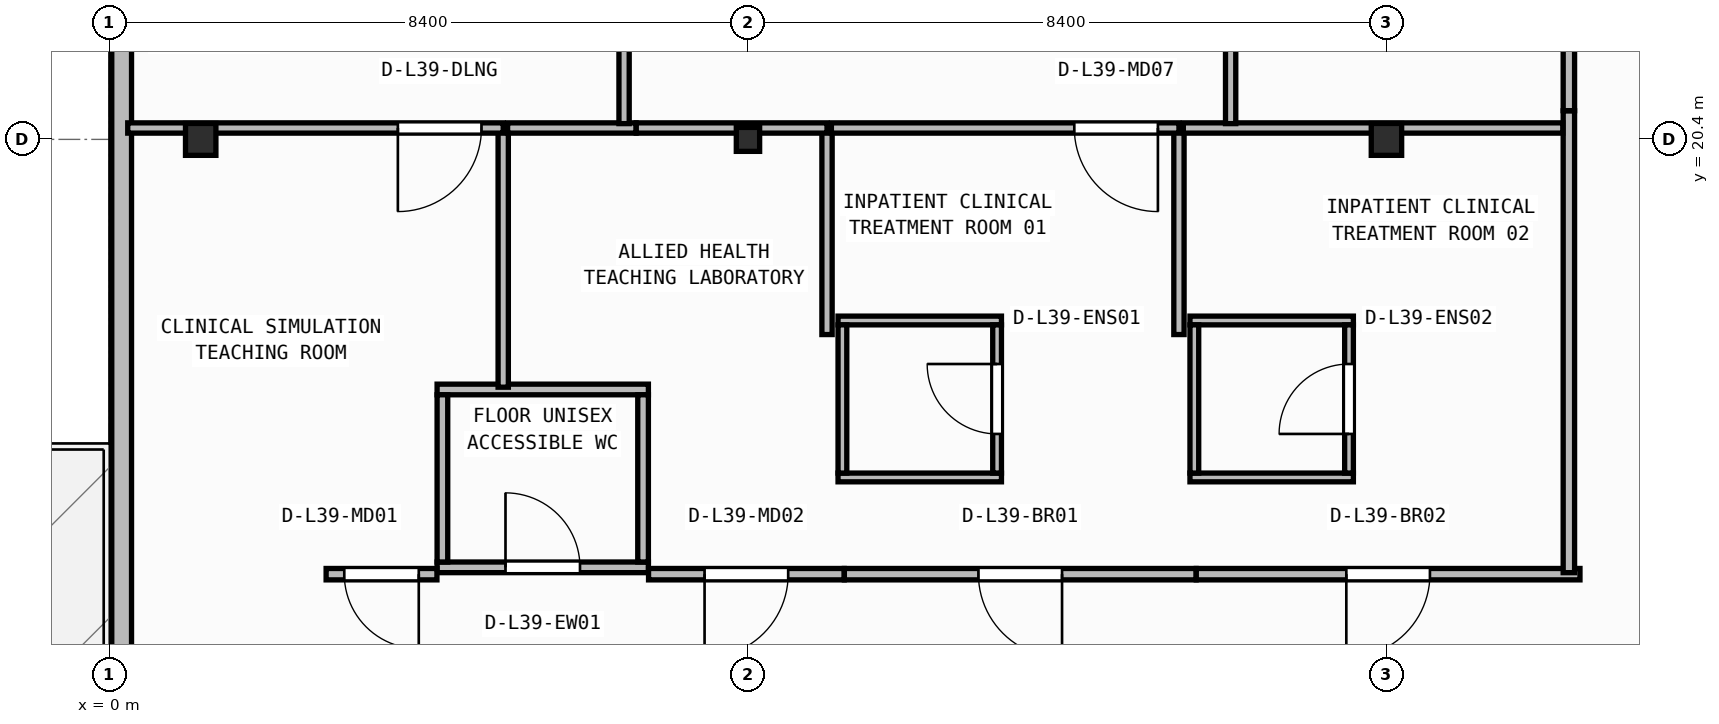
"""IFC4 building model, lengths in metres.
Left out: names, types, materials, properties, quantities, classifications, styles, units other than length and angle.
Written with IfcOpenShell. Run it as: python <this file> out.ifc"""

import sys

from ifc_helpers import new_model, si_unit, direction, frame, frame_2d, origin, origin_2d, place, context, subcontext, project, spatial, rectangle, i_section, extrude, element, fill, save


model = new_model("IFC4")
c1 = context("Model", 3, precision=1e-05, world=origin(), true_north=direction((0.0, 1.0)))
c2 = subcontext(c1, "Body", "Model", "MODEL_VIEW")
j1 = project(units=[si_unit("LENGTHUNIT", "METRE"), si_unit("PLANEANGLEUNIT", "RADIAN")], contexts=[c1])
p1 = place(None, origin())
s1 = spatial("IfcSite", under=j1, at=p1, CompositionType="ELEMENT")
p2 = place(p1, origin())
s2 = spatial("IfcBuilding", under=s1, at=p2, CompositionType="ELEMENT")
p3 = place(p2, frame((0.0, 0.0, 158.65)))
s3 = spatial("IfcBuildingStorey", under=s2, at=p3, CompositionType="ELEMENT", Elevation=158.65)
p4 = place(p3, frame((1.2, 20.4, 0.0), z_axis=(0.0, 0.0, 1.0), x_axis=(1.0, 0.0, 0.0)))
e1 = element("IfcColumn", 1, at=p4, inside=s3, PredefinedType="COLUMN", context=c2, shape_type="SweptSolid", body=[
    extrude(i_section(OverallWidth=0.4, OverallDepth=0.42, WebThickness=0.025, FlangeThickness=0.04, at=origin_2d()), origin(), (0.0, 0.0, 1.0), 3.95),
])
p5 = place(p3, frame((8.4, 20.4, 0.0), z_axis=(0.0, 0.0, 1.0), x_axis=(1.0, 0.0, 0.0)))
e2 = element("IfcColumn", 2, at=p5, inside=s3, PredefinedType="COLUMN", context=c2, shape_type="SweptSolid", body=[
    extrude(i_section(OverallWidth=0.307, OverallDepth=0.315, WebThickness=0.012, FlangeThickness=0.019, FilletRadius=0.017, at=origin_2d()), origin(), (0.0, 0.0, 1.0), 3.95),
])
p6 = place(p3, frame((16.8, 20.4, 0.0), z_axis=(0.0, 0.0, 1.0), x_axis=(1.0, 0.0, 0.0)))
e3 = element("IfcColumn", 3, at=p6, inside=s3, PredefinedType="COLUMN", context=c2, shape_type="SweptSolid", body=[
    extrude(i_section(OverallWidth=0.4, OverallDepth=0.42, WebThickness=0.025, FlangeThickness=0.04, at=origin_2d()), origin(), (0.0, 0.0, 1.0), 3.95),
])
p7 = place(p3, frame((0.16, 40.64, 0.0), z_axis=(0.0, 0.0, 1.0), x_axis=(0.0, -1.0, 0.0)))
e4 = element("IfcWall", 4, at=p7, inside=s3, PredefinedType="STANDARD", context=c2, shape_type="SweptSolid", body=[
    extrude(rectangle(XDim=37.88, YDim=0.26, at=frame_2d((18.94, 0.0))), origin(), (0.0, 0.0, 1.0), 3.71),
])
p8 = place(p7, frame((29.865, 0.0, 0.0)))
e5 = element("IfcOpeningElement", 5, at=p8, cuts=e4, PredefinedType="OPENING", context=c2, shape_type="SweptSolid", body=[
    extrude(rectangle(XDim=1.3, YDim=2.15, at=frame_2d((0.65, 1.075))), frame((0.0, 0.14, 0.0), z_axis=(0.0, -1.0, 0.0), x_axis=(1.0, 0.0, 0.0)), (0.0, 0.0, 1.0), 0.28),
])
p9 = place(p3, frame((4.31, 14.77, 0.0), z_axis=(0.0, 0.0, 1.0), x_axis=(1.0, 0.0, 0.0)))
e6 = element("IfcWall", 6, at=p9, inside=s3, PredefinedType="PARTITIONING", context=c2, shape_type="SweptSolid", body=[
    extrude(rectangle(XDim=2.78, YDim=0.14, at=frame_2d((1.39, 0.0))), origin(), (0.0, 0.0, 1.0), 3.71),
])
p10 = place(p9, frame((0.9, 0.0, 0.0)))
e7 = element("IfcOpeningElement", 7, at=p10, cuts=e6, PredefinedType="OPENING", context=c2, shape_type="SweptSolid", body=[
    extrude(rectangle(XDim=0.98, YDim=2.1, at=frame_2d((0.49, 1.05))), frame((0.0, 0.08, 0.0), z_axis=(0.0, -1.0, 0.0), x_axis=(1.0, 0.0, 0.0)), (0.0, 0.0, 1.0), 0.16),
])
p11 = place(p3, frame((4.31, 17.11, 0.0), z_axis=(0.0, 0.0, 1.0), x_axis=(1.0, 0.0, 0.0)))
e8 = element("IfcWall", 8, at=p11, inside=s3, PredefinedType="PARTITIONING", context=c2, shape_type="SweptSolid", body=[
    extrude(rectangle(XDim=2.78, YDim=0.14, at=frame_2d((1.39, 0.0))), origin(), (0.0, 0.0, 1.0), 3.71),
])
for number, where, z_axis, x_axis in (
    (9, (4.38, 14.84, 0.0), (0.0, 0.0, 1.0), (0.0, 1.0, 0.0)),
    (10, (7.02, 14.84, 0.0), (0.0, 0.0, 1.0), (0.0, 1.0, 0.0)),
):
    element("IfcWall", number, at=place(p3, frame(where, z_axis=z_axis, x_axis=x_axis)), inside=s3, PredefinedType="PARTITIONING", context=c2, shape_type="SweptSolid", body=[
        extrude(rectangle(XDim=2.2, YDim=0.14, at=frame_2d((1.1, 0.0))), origin(), (0.0, 0.0, 1.0), 3.71),
    ])
for number, where, z_axis, x_axis in (
    (11, (9.585, 15.952, 0.0), (0.0, 0.0, 1.0), (1.0, 0.0, 0.0)),
    (12, (9.585, 18.018, 0.0), (0.0, 0.0, 1.0), (1.0, 0.0, 0.0)),
):
    element("IfcWall", number, at=place(p3, frame(where, z_axis=z_axis, x_axis=x_axis)), inside=s3, PredefinedType="PARTITIONING", context=c2, shape_type="SweptSolid", body=[
        extrude(rectangle(XDim=2.15, YDim=0.115, at=frame_2d((1.075, 0.0))), origin(), (0.0, 0.0, 1.0), 3.71),
    ])
p12 = place(p3, frame((9.643, 16.01, 0.0), z_axis=(0.0, 0.0, 1.0), x_axis=(0.0, 1.0, 0.0)))
e13 = element("IfcWall", 13, at=p12, inside=s3, PredefinedType="PARTITIONING", context=c2, shape_type="SweptSolid", body=[
    extrude(rectangle(XDim=1.95, YDim=0.115, at=frame_2d((0.975, 0.0))), origin(), (0.0, 0.0, 1.0), 3.71),
])
p13 = place(p3, frame((11.677, 16.01, 0.0), z_axis=(0.0, 0.0, 1.0), x_axis=(0.0, 1.0, 0.0)))
e14 = element("IfcWall", 14, at=p13, inside=s3, PredefinedType="PARTITIONING", context=c2, shape_type="SweptSolid", body=[
    extrude(rectangle(XDim=1.95, YDim=0.115, at=frame_2d((0.975, 0.0))), origin(), (0.0, 0.0, 1.0), 3.71),
])
p14 = place(p13, frame((0.515, 0.0, 0.0)))
e15 = element("IfcOpeningElement", 15, at=p14, cuts=e14, PredefinedType="OPENING", context=c2, shape_type="SweptSolid", body=[
    extrude(rectangle(XDim=0.92, YDim=2.1, at=frame_2d((0.46, 1.05))), frame((0.0, 0.067, 0.0), z_axis=(0.0, -1.0, 0.0), x_axis=(1.0, 0.0, 0.0)), (0.0, 0.0, 1.0), 0.135),
])
for number, where, z_axis, x_axis in (
    (16, (14.215, 15.952, 0.0), (0.0, 0.0, 1.0), (1.0, 0.0, 0.0)),
    (17, (14.215, 18.018, 0.0), (0.0, 0.0, 1.0), (1.0, 0.0, 0.0)),
):
    element("IfcWall", number, at=place(p3, frame(where, z_axis=z_axis, x_axis=x_axis)), inside=s3, PredefinedType="PARTITIONING", context=c2, shape_type="SweptSolid", body=[
        extrude(rectangle(XDim=2.15, YDim=0.115, at=frame_2d((1.075, 0.0))), origin(), (0.0, 0.0, 1.0), 3.71),
    ])
p15 = place(p3, frame((14.272, 16.01, 0.0), z_axis=(0.0, 0.0, 1.0), x_axis=(0.0, 1.0, 0.0)))
e18 = element("IfcWall", 18, at=p15, inside=s3, PredefinedType="PARTITIONING", context=c2, shape_type="SweptSolid", body=[
    extrude(rectangle(XDim=1.95, YDim=0.115, at=frame_2d((0.975, 0.0))), origin(), (0.0, 0.0, 1.0), 3.71),
])
p16 = place(p3, frame((16.308, 16.01, 0.0), z_axis=(0.0, 0.0, 1.0), x_axis=(0.0, 1.0, 0.0)))
e19 = element("IfcWall", 19, at=p16, inside=s3, PredefinedType="PARTITIONING", context=c2, shape_type="SweptSolid", body=[
    extrude(rectangle(XDim=1.95, YDim=0.115, at=frame_2d((0.975, 0.0))), origin(), (0.0, 0.0, 1.0), 3.71),
])
p17 = place(p16, frame((0.515, 0.0, 0.0)))
e20 = element("IfcOpeningElement", 20, at=p17, cuts=e19, PredefinedType="OPENING", context=c2, shape_type="SweptSolid", body=[
    extrude(rectangle(XDim=0.92, YDim=2.1, at=frame_2d((0.46, 1.05))), frame((0.0, 0.067, 0.0), z_axis=(0.0, -1.0, 0.0), x_axis=(1.0, 0.0, 0.0)), (0.0, 0.0, 1.0), 0.135),
])
p18 = place(p3, frame((4.308, 14.68, 0.0), z_axis=(0.0, 0.0, 1.0), x_axis=(-1.0, 0.0, 0.0)))
e21 = element("IfcWall", 21, at=p18, inside=s3, PredefinedType="PARTITIONING", context=c2, shape_type="SweptSolid", body=[
    extrude(rectangle(XDim=1.458, YDim=0.15, at=frame_2d((0.729, 0.0))), origin(), (0.0, 0.0, 1.0), 3.71),
])
p19 = place(p18, frame((0.239, 0.0, 0.0)))
e22 = element("IfcOpeningElement", 22, at=p19, cuts=e21, PredefinedType="OPENING", context=c2, shape_type="SweptSolid", body=[
    extrude(rectangle(XDim=0.98, YDim=2.1, at=frame_2d((0.49, 1.05))), frame((0.0, 0.085, 0.0), z_axis=(0.0, -1.0, 0.0), x_axis=(1.0, 0.0, 0.0)), (0.0, 0.0, 1.0), 0.17),
])
p20 = place(p3, frame((9.666, 14.68, 0.0), z_axis=(0.0, 0.0, 1.0), x_axis=(-1.0, 0.0, 0.0)))
e23 = element("IfcWall", 23, at=p20, inside=s3, PredefinedType="PARTITIONING", context=c2, shape_type="SweptSolid", body=[
    extrude(rectangle(XDim=2.574, YDim=0.15, at=frame_2d((1.287, 0.0))), origin(), (0.0, 0.0, 1.0), 3.71),
])
p21 = place(p20, frame((0.737, 0.0, 0.0)))
e24 = element("IfcOpeningElement", 24, at=p21, cuts=e23, PredefinedType="OPENING", context=c2, shape_type="SweptSolid", body=[
    extrude(rectangle(XDim=1.1, YDim=2.1, at=frame_2d((0.55, 1.05))), frame((0.0, 0.085, 0.0), z_axis=(0.0, -1.0, 0.0), x_axis=(1.0, 0.0, 0.0)), (0.0, 0.0, 1.0), 0.17),
])
p22 = place(p3, frame((14.296, 14.68, 0.0), z_axis=(0.0, 0.0, 1.0), x_axis=(-1.0, 0.0, 0.0)))
e25 = element("IfcWall", 25, at=p22, inside=s3, PredefinedType="PARTITIONING", context=c2, shape_type="SweptSolid", body=[
    extrude(rectangle(XDim=4.628, YDim=0.15, at=frame_2d((2.314, 0.0))), origin(), (0.0, 0.0, 1.0), 3.71),
])
p23 = place(p22, frame((1.764, 0.0, 0.0)))
e26 = element("IfcOpeningElement", 26, at=p23, cuts=e25, PredefinedType="OPENING", context=c2, shape_type="SweptSolid", body=[
    extrude(rectangle(XDim=1.1, YDim=2.1, at=frame_2d((0.55, 1.05))), frame((0.0, 0.085, 0.0), z_axis=(0.0, -1.0, 0.0), x_axis=(1.0, 0.0, 0.0)), (0.0, 0.0, 1.0), 0.17),
])
p24 = place(p3, frame((19.346, 14.68, 0.0), z_axis=(0.0, 0.0, 1.0), x_axis=(-1.0, 0.0, 0.0)))
e27 = element("IfcWall", 27, at=p24, inside=s3, PredefinedType="PARTITIONING", context=c2, shape_type="SweptSolid", body=[
    extrude(rectangle(XDim=5.048, YDim=0.15, at=frame_2d((2.524, 0.0))), origin(), (0.0, 0.0, 1.0), 3.71),
])
p25 = place(p24, frame((1.974, 0.0, 0.0)))
e28 = element("IfcOpeningElement", 28, at=p25, cuts=e27, PredefinedType="OPENING", context=c2, shape_type="SweptSolid", body=[
    extrude(rectangle(XDim=1.1, YDim=2.1, at=frame_2d((0.55, 1.05))), frame((0.0, 0.085, 0.0), z_axis=(0.0, -1.0, 0.0), x_axis=(1.0, 0.0, 0.0)), (0.0, 0.0, 1.0), 0.17),
])
p26 = place(p3, frame((19.2, 20.776, 0.0), z_axis=(0.0, 0.0, 1.0), x_axis=(0.0, -1.0, 0.0)))
e29 = element("IfcWall", 29, at=p26, inside=s3, PredefinedType="PARTITIONING", context=c2, shape_type="SweptSolid", body=[
    extrude(rectangle(XDim=6.076, YDim=0.15, at=frame_2d((3.038, 0.0))), origin(), (0.0, 0.0, 1.0), 3.71),
])
p27 = place(p3, frame((19.2, 27.26, 0.0), z_axis=(0.0, 0.0, 1.0), x_axis=(0.0, -1.0, 0.0)))
e30 = element("IfcWall", 30, at=p27, inside=s3, PredefinedType="PARTITIONING", context=c2, shape_type="SweptSolid", body=[
    extrude(rectangle(XDim=6.482, YDim=0.15, at=frame_2d((3.241, 0.0))), origin(), (0.0, 0.0, 1.0), 3.71),
])
p28 = place(p27, frame((2.068, 0.0, 0.0)))
e31 = element("IfcOpeningElement", 31, at=p28, cuts=e30, PredefinedType="OPENING", context=c2, shape_type="SweptSolid", body=[
    extrude(rectangle(XDim=1.1, YDim=2.1, at=frame_2d((0.55, 1.05))), frame((0.0, 0.085, 0.0), z_axis=(0.0, -1.0, 0.0), x_axis=(1.0, 0.0, 0.0)), (0.0, 0.0, 1.0), 0.17),
])
p29 = place(p3, frame((5.18, 17.14, 0.0), z_axis=(0.0, 0.0, 1.0), x_axis=(0.0, 1.0, 0.0)))
e32 = element("IfcWall", 32, at=p29, inside=s3, PredefinedType="PARTITIONING", context=c2, shape_type="SweptSolid", body=[
    extrude(rectangle(XDim=3.41, YDim=0.135, at=frame_2d((1.705, 0.0))), origin(), (0.0, 0.0, 1.0), 3.71),
])
p30 = place(p3, frame((5.18, 20.55, 0.0), z_axis=(0.0, 0.0, 1.0), x_axis=(-1.0, 0.0, 0.0)))
e33 = element("IfcWall", 33, at=p30, inside=s3, PredefinedType="PARTITIONING", context=c2, shape_type="SweptSolid", body=[
    extrude(rectangle(XDim=4.94, YDim=0.135, at=frame_2d((2.47, 0.0))), origin(), (0.0, 0.0, 1.0), 3.083),
])
p31 = place(p30, frame((0.286, 0.0, 0.0)))
e34 = element("IfcOpeningElement", 34, at=p31, cuts=e33, PredefinedType="OPENING", context=c2, shape_type="SweptSolid", body=[
    extrude(rectangle(XDim=1.1, YDim=2.1, at=frame_2d((0.55, 1.05))), frame((0.0, 0.077, 0.0), z_axis=(0.0, -1.0, 0.0), x_axis=(1.0, 0.0, 0.0)), (0.0, 0.0, 1.0), 0.155),
])
p32 = place(p3, frame((9.44, 17.833, 0.0), z_axis=(0.0, 0.0, 1.0), x_axis=(0.0, 1.0, 0.0)))
e35 = element("IfcWall", 35, at=p32, inside=s3, PredefinedType="PARTITIONING", context=c2, shape_type="SweptSolid", body=[
    extrude(rectangle(XDim=2.718, YDim=0.135, at=frame_2d((1.359, 0.0))), origin(), (0.0, 0.0, 1.0), 3.71),
])
p33 = place(p3, frame((6.928, 20.55, 0.0), z_axis=(0.0, 0.0, 1.0), x_axis=(-1.0, 0.0, 0.0)))
e36 = element("IfcWall", 36, at=p33, inside=s3, PredefinedType="PARTITIONING", context=c2, shape_type="SweptSolid", body=[
    extrude(rectangle(XDim=1.691, YDim=0.135, at=frame_2d((0.845, 0.0))), origin(), (0.0, 0.0, 1.0), 3.083),
])
p34 = place(p3, frame((9.44, 20.55, 0.0), z_axis=(0.0, 0.0, 1.0), x_axis=(-1.0, 0.0, 0.0)))
e37 = element("IfcWall", 37, at=p34, inside=s3, PredefinedType="PARTITIONING", context=c2, shape_type="SweptSolid", body=[
    extrude(rectangle(XDim=2.51, YDim=0.135, at=frame_2d((1.255, 0.0))), origin(), (0.0, 0.0, 1.0), 3.083),
])
p35 = place(p3, frame((14.07, 17.833, 0.0), z_axis=(0.0, 0.0, 1.0), x_axis=(0.0, 1.0, 0.0)))
e38 = element("IfcWall", 38, at=p35, inside=s3, PredefinedType="PARTITIONING", context=c2, shape_type="SweptSolid", body=[
    extrude(rectangle(XDim=2.718, YDim=0.135, at=frame_2d((1.359, 0.0))), origin(), (0.0, 0.0, 1.0), 3.71),
])
p36 = place(p3, frame((14.07, 20.55, 0.0), z_axis=(0.0, 0.0, 1.0), x_axis=(-1.0, 0.0, 0.0)))
e39 = element("IfcWall", 39, at=p36, inside=s3, PredefinedType="PARTITIONING", context=c2, shape_type="SweptSolid", body=[
    extrude(rectangle(XDim=4.573, YDim=0.135, at=frame_2d((2.286, 0.0))), origin(), (0.0, 0.0, 1.0), 3.083),
])
p37 = place(p36, frame((0.277, 0.0, 0.0)))
e40 = element("IfcOpeningElement", 40, at=p37, cuts=e39, PredefinedType="OPENING", context=c2, shape_type="SweptSolid", body=[
    extrude(rectangle(XDim=1.1, YDim=2.1, at=frame_2d((0.55, 1.05))), frame((0.0, 0.077, 0.0), z_axis=(0.0, -1.0, 0.0), x_axis=(1.0, 0.0, 0.0)), (0.0, 0.0, 1.0), 0.155),
])
p38 = place(p3, frame((19.12, 20.55, 0.0), z_axis=(0.0, 0.0, 1.0), x_axis=(-1.0, 0.0, 0.0)))
e41 = element("IfcWall", 41, at=p38, inside=s3, PredefinedType="PARTITIONING", context=c2, shape_type="SweptSolid", body=[
    extrude(rectangle(XDim=4.993, YDim=0.135, at=frame_2d((2.496, 0.0))), origin(), (0.0, 0.0, 1.0), 3.083),
])
for number, where, z_axis, x_axis in (
    (42, (6.77, 20.607, 0.0), (0.0, 0.0, 1.0), (0.0, 1.0, 0.0)),
    (43, (14.75, 20.607, 0.0), (0.0, 0.0, 1.0), (0.0, 1.0, 0.0)),
):
    element("IfcWall", number, at=place(p3, frame(where, z_axis=z_axis, x_axis=x_axis)), inside=s3, PredefinedType="PARTITIONING", context=c2, shape_type="SweptSolid", body=[
        extrude(rectangle(XDim=6.493, YDim=0.135, at=frame_2d((3.246, 0.0))), origin(), (0.0, 0.0, 1.0), 3.71),
    ])
p39 = place(p10, origin())
e44 = element("IfcDoor", 44, at=p39, inside=s3, OperationType="SINGLE_SWING_LEFT", PredefinedType="DOOR", context=c2, shape_type="SweptSolid", body=[
    extrude(rectangle(XDim=0.98, YDim=2.1, at=frame_2d((0.49, 1.05))), frame((0.0, 0.025, 0.0), z_axis=(0.0, -1.0, 0.0), x_axis=(1.0, 0.0, 0.0)), (0.0, 0.0, 1.0), 0.05),
])
fill(e7, e44)
p40 = place(p14, origin())
e45 = element("IfcDoor", 45, at=p40, inside=s3, OperationType="SINGLE_SWING_RIGHT", PredefinedType="DOOR", context=c2, shape_type="SweptSolid", body=[
    extrude(rectangle(XDim=0.92, YDim=2.1, at=frame_2d((0.46, 1.05))), frame((0.0, 0.025, 0.0), z_axis=(0.0, -1.0, 0.0), x_axis=(1.0, 0.0, 0.0)), (0.0, 0.0, 1.0), 0.05),
])
fill(e15, e45)
p41 = place(p17, origin())
e46 = element("IfcDoor", 46, at=p41, inside=s3, OperationType="SINGLE_SWING_LEFT", PredefinedType="DOOR", context=c2, shape_type="SweptSolid", body=[
    extrude(rectangle(XDim=0.92, YDim=2.1, at=frame_2d((0.46, 1.05))), frame((0.0, 0.025, 0.0), z_axis=(0.0, -1.0, 0.0), x_axis=(1.0, 0.0, 0.0)), (0.0, 0.0, 1.0), 0.05),
])
fill(e20, e46)
p42 = place(p19, origin())
e47 = element("IfcDoor", 47, at=p42, inside=s3, OperationType="SINGLE_SWING_LEFT", PredefinedType="DOOR", context=c2, shape_type="SweptSolid", body=[
    extrude(rectangle(XDim=0.98, YDim=2.1, at=frame_2d((0.49, 1.05))), frame((0.0, 0.025, 0.0), z_axis=(0.0, -1.0, 0.0), x_axis=(1.0, 0.0, 0.0)), (0.0, 0.0, 1.0), 0.05),
])
fill(e22, e47)
p43 = place(p21, origin())
e48 = element("IfcDoor", 48, at=p43, inside=s3, OperationType="SINGLE_SWING_RIGHT", PredefinedType="DOOR", context=c2, shape_type="SweptSolid", body=[
    extrude(rectangle(XDim=1.1, YDim=2.1, at=frame_2d((0.55, 1.05))), frame((0.0, 0.025, 0.0), z_axis=(0.0, -1.0, 0.0), x_axis=(1.0, 0.0, 0.0)), (0.0, 0.0, 1.0), 0.05),
])
fill(e24, e48)
p44 = place(p23, origin())
e49 = element("IfcDoor", 49, at=p44, inside=s3, OperationType="SINGLE_SWING_LEFT", PredefinedType="DOOR", context=c2, shape_type="SweptSolid", body=[
    extrude(rectangle(XDim=1.1, YDim=2.1, at=frame_2d((0.55, 1.05))), frame((0.0, 0.025, 0.0), z_axis=(0.0, -1.0, 0.0), x_axis=(1.0, 0.0, 0.0)), (0.0, 0.0, 1.0), 0.05),
])
fill(e26, e49)
p45 = place(p25, origin())
e50 = element("IfcDoor", 50, at=p45, inside=s3, OperationType="SINGLE_SWING_RIGHT", PredefinedType="DOOR", context=c2, shape_type="SweptSolid", body=[
    extrude(rectangle(XDim=1.1, YDim=2.1, at=frame_2d((0.55, 1.05))), frame((0.0, 0.025, 0.0), z_axis=(0.0, -1.0, 0.0), x_axis=(1.0, 0.0, 0.0)), (0.0, 0.0, 1.0), 0.05),
])
fill(e28, e50)
p46 = place(p31, origin())
e51 = element("IfcDoor", 51, at=p46, inside=s3, OperationType="SINGLE_SWING_RIGHT", PredefinedType="DOOR", context=c2, shape_type="SweptSolid", body=[
    extrude(rectangle(XDim=1.1, YDim=2.1, at=frame_2d((0.55, 1.05))), frame((0.0, 0.025, 0.0), z_axis=(0.0, -1.0, 0.0), x_axis=(1.0, 0.0, 0.0)), (0.0, 0.0, 1.0), 0.05),
])
fill(e34, e51)
p47 = place(p37, origin())
e52 = element("IfcDoor", 52, at=p47, inside=s3, OperationType="SINGLE_SWING_LEFT", PredefinedType="DOOR", context=c2, shape_type="SweptSolid", body=[
    extrude(rectangle(XDim=1.1, YDim=2.1, at=frame_2d((0.55, 1.05))), frame((0.0, 0.025, 0.0), z_axis=(0.0, -1.0, 0.0), x_axis=(1.0, 0.0, 0.0)), (0.0, 0.0, 1.0), 0.05),
])
fill(e40, e52)
save(model, sys.argv[1])
